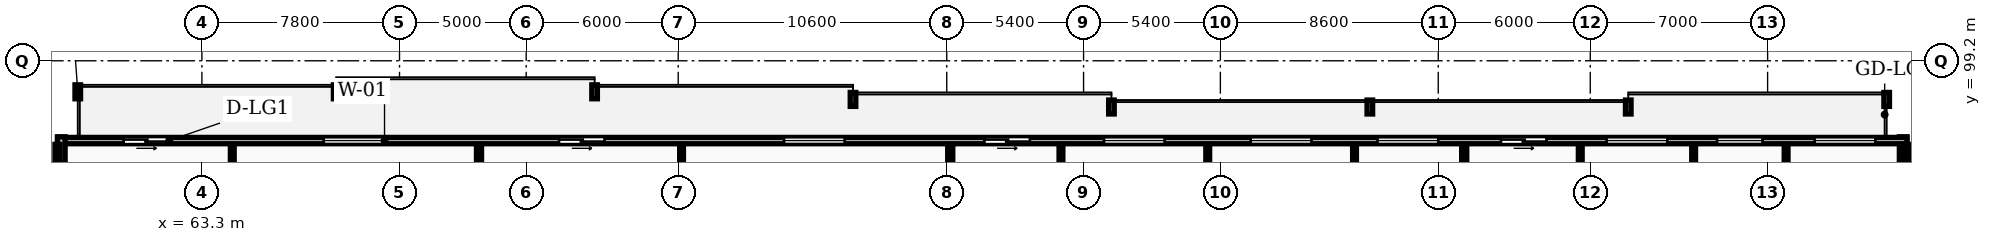
"""IFC4 building model, lengths in metres.
Left out: names, types, materials, properties, quantities, classifications, styles, units other than length and angle.
Written with IfcOpenShell. Run it as: python <this file> out.ifc"""

import sys

from ifc_helpers import new_model, si_unit, direction, frame, frame_2d, origin, place, context, subcontext, project, spatial, rectangle, extrude, element, fill, save


model = new_model("IFC4")
c1 = context("Model", 3, precision=1e-05, world=origin(), true_north=direction((0.0, 1.0)))
c2 = subcontext(c1, "Body", "Model", "MODEL_VIEW")
j1 = project(units=[si_unit("LENGTHUNIT", "METRE"), si_unit("PLANEANGLEUNIT", "RADIAN")], contexts=[c1])
p1 = place(None, origin())
s1 = spatial("IfcSite", under=j1, at=p1, CompositionType="ELEMENT")
p2 = place(p1, origin())
s2 = spatial("IfcBuilding", under=s1, at=p2, CompositionType="ELEMENT")
p3 = place(p2, frame((0.0, 0.0, 132.8)))
s3 = spatial("IfcBuildingStorey", under=s2, at=p3, CompositionType="ELEMENT", Elevation=132.8)
p4 = place(p3, frame((130.45, 92.6, 0.0), z_axis=(0.0, 0.0, 1.0), x_axis=(0.0, 1.0, 0.0)))
e1 = element("IfcWall", 1, at=p4, inside=s3, PredefinedType="STANDARD", context=c2, shape_type="SweptSolid", body=[
    extrude(rectangle(XDim=3.6, YDim=0.3, at=frame_2d((1.8, 0.0))), origin(), (0.0, 0.0, 1.0), 2.97),
])
p5 = place(p3, frame((130.6, 96.05, 0.0), z_axis=(0.0, 0.0, 1.0), x_axis=(-1.0, 0.0, 0.0)))
e2 = element("IfcWall", 2, at=p5, inside=s3, PredefinedType="STANDARD", context=c2, shape_type="SweptSolid", body=[
    extrude(rectangle(XDim=73.0, YDim=0.25, at=frame_2d((36.5, 0.0))), origin(), (0.0, 0.0, 1.0), 2.97),
])
p6 = place(p5, frame((68.591, 0.0, 0.0)))
e3 = element("IfcOpeningElement", 3, at=p6, cuts=e2, PredefinedType="OPENING", context=c2, shape_type="SweptSolid", body=[
    extrude(rectangle(XDim=1.8, YDim=2.2, at=frame_2d((0.9, 1.1))), frame((0.0, 0.135, 0.0), z_axis=(0.0, -1.0, 0.0), x_axis=(1.0, 0.0, 0.0)), (0.0, 0.0, 1.0), 0.27),
])
p7 = place(p5, frame((60.092, 0.0, 0.85)))
e4 = element("IfcOpeningElement", 4, at=p7, cuts=e2, PredefinedType="OPENING", context=c2, shape_type="SweptSolid", body=[
    extrude(rectangle(XDim=2.4, YDim=1.9, at=frame_2d((1.2, 0.95))), frame((0.0, 0.135, 0.0), z_axis=(0.0, -1.0, 0.0), x_axis=(1.0, 0.0, 0.0)), (0.0, 0.0, 1.0), 0.27),
])
p8 = place(p5, frame((51.405, 0.0, 0.0)))
e5 = element("IfcOpeningElement", 5, at=p8, cuts=e2, PredefinedType="OPENING", context=c2, shape_type="SweptSolid", body=[
    extrude(rectangle(XDim=1.8, YDim=2.2, at=frame_2d((0.9, 1.1))), frame((0.0, 0.135, 0.0), z_axis=(0.0, -1.0, 0.0), x_axis=(1.0, 0.0, 0.0)), (0.0, 0.0, 1.0), 0.27),
])
p9 = place(p5, frame((41.925, 0.0, 0.85)))
e6 = element("IfcOpeningElement", 6, at=p9, cuts=e2, PredefinedType="OPENING", context=c2, shape_type="SweptSolid", body=[
    extrude(rectangle(XDim=2.4, YDim=1.9, at=frame_2d((1.2, 0.95))), frame((0.0, 0.135, 0.0), z_axis=(0.0, -1.0, 0.0), x_axis=(1.0, 0.0, 0.0)), (0.0, 0.0, 1.0), 0.27),
])
p10 = place(p5, frame((29.296, 0.0, 0.85)))
e7 = element("IfcOpeningElement", 7, at=p10, cuts=e2, PredefinedType="OPENING", context=c2, shape_type="SweptSolid", body=[
    extrude(rectangle(XDim=2.4, YDim=1.9, at=frame_2d((1.2, 0.95))), frame((0.0, 0.135, 0.0), z_axis=(0.0, -1.0, 0.0), x_axis=(1.0, 0.0, 0.0)), (0.0, 0.0, 1.0), 0.27),
])
p11 = place(p5, frame((23.502, 0.0, 0.85)))
e8 = element("IfcOpeningElement", 8, at=p11, cuts=e2, PredefinedType="OPENING", context=c2, shape_type="SweptSolid", body=[
    extrude(rectangle(XDim=2.4, YDim=1.9, at=frame_2d((1.2, 0.95))), frame((0.0, 0.135, 0.0), z_axis=(0.0, -1.0, 0.0), x_axis=(1.0, 0.0, 0.0)), (0.0, 0.0, 1.0), 0.27),
])
p12 = place(p5, frame((34.617, 0.0, 0.0)))
e9 = element("IfcOpeningElement", 9, at=p12, cuts=e2, PredefinedType="OPENING", context=c2, shape_type="SweptSolid", body=[
    extrude(rectangle(XDim=1.8, YDim=2.2, at=frame_2d((0.9, 1.1))), frame((0.0, 0.135, 0.0), z_axis=(0.0, -1.0, 0.0), x_axis=(1.0, 0.0, 0.0)), (0.0, 0.0, 1.0), 0.27),
])
p13 = place(p5, frame((18.5, 0.0, 0.85)))
e10 = element("IfcOpeningElement", 10, at=p13, cuts=e2, PredefinedType="OPENING", context=c2, shape_type="SweptSolid", body=[
    extrude(rectangle(XDim=2.4, YDim=1.9, at=frame_2d((1.2, 0.95))), frame((0.0, 0.135, 0.0), z_axis=(0.0, -1.0, 0.0), x_axis=(1.0, 0.0, 0.0)), (0.0, 0.0, 1.0), 0.27),
])
p14 = place(p5, frame((9.458, 0.0, 0.85)))
e11 = element("IfcOpeningElement", 11, at=p14, cuts=e2, PredefinedType="OPENING", context=c2, shape_type="SweptSolid", body=[
    extrude(rectangle(XDim=2.4, YDim=1.9, at=frame_2d((1.2, 0.95))), frame((0.0, 0.135, 0.0), z_axis=(0.0, -1.0, 0.0), x_axis=(1.0, 0.0, 0.0)), (0.0, 0.0, 1.0), 0.27),
])
p15 = place(p5, frame((5.695, 0.0, 0.85)))
e12 = element("IfcOpeningElement", 12, at=p15, cuts=e2, PredefinedType="OPENING", context=c2, shape_type="SweptSolid", body=[
    extrude(rectangle(XDim=1.8, YDim=1.8, at=frame_2d((0.9, 0.9))), frame((0.0, 0.135, 0.0), z_axis=(0.0, -1.0, 0.0), x_axis=(1.0, 0.0, 0.0)), (0.0, 0.0, 1.0), 0.27),
])
p16 = place(p5, frame((14.225, 0.0, 0.0)))
e13 = element("IfcOpeningElement", 13, at=p16, cuts=e2, PredefinedType="OPENING", context=c2, shape_type="SweptSolid", body=[
    extrude(rectangle(XDim=1.8, YDim=2.2, at=frame_2d((0.9, 1.1))), frame((0.0, 0.135, 0.0), z_axis=(0.0, -1.0, 0.0), x_axis=(1.0, 0.0, 0.0)), (0.0, 0.0, 1.0), 0.27),
])
p17 = place(p5, frame((1.245, 0.0, 0.85)))
e14 = element("IfcOpeningElement", 14, at=p17, cuts=e2, PredefinedType="OPENING", context=c2, shape_type="SweptSolid", body=[
    extrude(rectangle(XDim=2.4, YDim=1.9, at=frame_2d((1.2, 0.95))), frame((0.0, 0.135, 0.0), z_axis=(0.0, -1.0, 0.0), x_axis=(1.0, 0.0, 0.0)), (0.0, 0.0, 1.0), 0.27),
])
p18 = place(p3, frame((57.75, 96.2, 0.0), z_axis=(0.0, 0.0, 1.0), x_axis=(0.0, -1.0, 0.0)))
e15 = element("IfcWall", 15, at=p18, inside=s3, PredefinedType="STANDARD", context=c2, shape_type="SweptSolid", body=[
    extrude(rectangle(XDim=3.6, YDim=0.3, at=frame_2d((1.8, 0.0))), origin(), (0.0, 0.0, 1.0), 2.97),
])
for number, where, z_axis, x_axis in (
    (16, (57.6, 69.83, 0.0), (0.0, 0.0, 1.0), (0.0, 1.0, 0.0)),
    (17, (130.6, 69.83, 0.0), (0.0, 0.0, 1.0), (0.0, 1.0, 0.0)),
    (18, (74.238, 69.83, 0.0), (0.0, 0.0, 1.0), (0.0, 1.0, 0.0)),
):
    element("IfcWall", number, at=place(p3, frame(where, z_axis=z_axis, x_axis=x_axis)), inside=s3, PredefinedType="PARTITIONING", context=c2, shape_type="SweptSolid", body=[
        extrude(rectangle(XDim=26.07, YDim=0.2, at=frame_2d((13.035, 0.0))), origin(), (0.0, 0.0, 1.0), 2.97),
    ])
p19 = place(p3, frame((64.499, 91.43, 0.0), z_axis=(0.0, 0.0, 1.0), x_axis=(0.0, 1.0, 0.0)))
e19 = element("IfcWall", 19, at=p19, inside=s3, PredefinedType="PARTITIONING", context=c2, shape_type="SweptSolid", body=[
    extrude(rectangle(XDim=4.47, YDim=0.15, at=frame_2d((2.235, 0.0))), origin(), (0.0, 0.0, 1.0), 2.97),
])
p20 = place(p3, frame((92.837, 69.83, 0.0), z_axis=(0.0, 0.0, 1.0), x_axis=(0.0, 1.0, 0.0)))
e20 = element("IfcWall", 20, at=p20, inside=s3, PredefinedType="PARTITIONING", context=c2, shape_type="SweptSolid", body=[
    extrude(rectangle(XDim=26.07, YDim=0.2, at=frame_2d((13.035, 0.0))), origin(), (0.0, 0.0, 1.0), 2.97),
])
p21 = place(p3, frame((82.232, 91.43, 0.0), z_axis=(0.0, 0.0, 1.0), x_axis=(0.0, 1.0, 0.0)))
e21 = element("IfcWall", 21, at=p21, inside=s3, PredefinedType="PARTITIONING", context=c2, shape_type="SweptSolid", body=[
    extrude(rectangle(XDim=4.47, YDim=0.15, at=frame_2d((2.235, 0.0))), origin(), (0.0, 0.0, 1.0), 2.97),
])
p22 = place(p3, frame((113.125, 69.83, 0.0), z_axis=(0.0, 0.0, 1.0), x_axis=(0.0, 1.0, 0.0)))
e22 = element("IfcWall", 22, at=p22, inside=s3, PredefinedType="PARTITIONING", context=c2, shape_type="SweptSolid", body=[
    extrude(rectangle(XDim=26.07, YDim=0.2, at=frame_2d((13.035, 0.0))), origin(), (0.0, 0.0, 1.0), 2.97),
])
p23 = place(p3, frame((103.001, 91.43, 0.0), z_axis=(0.0, 0.0, 1.0), x_axis=(0.0, 1.0, 0.0)))
e23 = element("IfcWall", 23, at=p23, inside=s3, PredefinedType="PARTITIONING", context=c2, shape_type="SweptSolid", body=[
    extrude(rectangle(XDim=4.47, YDim=0.15, at=frame_2d((2.235, 0.0))), origin(), (0.0, 0.0, 1.0), 2.97),
])
p24 = place(p3, frame((97.208, 86.29, 0.0), z_axis=(0.0, 0.0, 1.0), x_axis=(0.0, 1.0, 0.0)))
e24 = element("IfcWall", 24, at=p24, inside=s3, PredefinedType="PARTITIONING", context=c2, shape_type="SweptSolid", body=[
    extrude(rectangle(XDim=9.61, YDim=0.15, at=frame_2d((4.805, 0.0))), origin(), (0.0, 0.0, 1.0), 2.97),
])
p25 = place(p24, frame((3.82, 0.0, 0.0)))
e25 = element("IfcOpeningElement", 25, at=p25, cuts=e24, PredefinedType="OPENING", context=c2, shape_type="SweptSolid", body=[
    extrude(rectangle(XDim=0.92, YDim=2.08, at=frame_2d((0.46, 1.04))), frame((0.0, 0.085, 0.0), z_axis=(0.0, -1.0, 0.0), x_axis=(1.0, 0.0, 0.0)), (0.0, 0.0, 1.0), 0.17),
])
p26 = place(p3, frame((108.795, 89.02, 0.0), z_axis=(0.0, 0.0, 1.0), x_axis=(0.0, 1.0, 0.0)))
e26 = element("IfcWall", 26, at=p26, inside=s3, PredefinedType="PARTITIONING", context=c2, shape_type="SweptSolid", body=[
    extrude(rectangle(XDim=6.88, YDim=0.15, at=frame_2d((3.44, 0.0))), origin(), (0.0, 0.0, 1.0), 2.97),
])
p27 = place(p26, frame((1.09, 0.0, 0.0)))
e27 = element("IfcOpeningElement", 27, at=p27, cuts=e26, PredefinedType="OPENING", context=c2, shape_type="SweptSolid", body=[
    extrude(rectangle(XDim=0.92, YDim=2.08, at=frame_2d((0.46, 1.04))), frame((0.0, 0.085, 0.0), z_axis=(0.0, -1.0, 0.0), x_axis=(1.0, 0.0, 0.0)), (0.0, 0.0, 1.0), 0.17),
])
p28 = place(p3, frame((122.18, 91.43, 0.0), z_axis=(0.0, 0.0, 1.0), x_axis=(0.0, 1.0, 0.0)))
e28 = element("IfcWall", 28, at=p28, inside=s3, PredefinedType="PARTITIONING", context=c2, shape_type="SweptSolid", body=[
    extrude(rectangle(XDim=4.47, YDim=0.15, at=frame_2d((2.235, 0.0))), origin(), (0.0, 0.0, 1.0), 2.97),
])
p29 = place(p3, frame((117.705, 86.29, 0.0), z_axis=(0.0, 0.0, 1.0), x_axis=(0.0, 1.0, 0.0)))
e29 = element("IfcWall", 29, at=p29, inside=s3, PredefinedType="PARTITIONING", context=c2, shape_type="SweptSolid", body=[
    extrude(rectangle(XDim=9.61, YDim=0.15, at=frame_2d((4.805, 0.0))), origin(), (0.0, 0.0, 1.0), 2.97),
])
p30 = place(p29, frame((2.88, 0.0, 0.0)))
e30 = element("IfcOpeningElement", 30, at=p30, cuts=e29, PredefinedType="OPENING", context=c2, shape_type="SweptSolid", body=[
    extrude(rectangle(XDim=0.92, YDim=2.08, at=frame_2d((0.46, 1.04))), frame((0.0, 0.085, 0.0), z_axis=(0.0, -1.0, 0.0), x_axis=(1.0, 0.0, 0.0)), (0.0, 0.0, 1.0), 0.17),
])
p31 = place(p3, frame((125.83, 88.91, 0.0), z_axis=(0.0, 0.0, 1.0), x_axis=(0.0, 1.0, 0.0)))
e31 = element("IfcWall", 31, at=p31, inside=s3, PredefinedType="PARTITIONING", context=c2, shape_type="SweptSolid", body=[
    extrude(rectangle(XDim=6.99, YDim=0.15, at=frame_2d((3.495, 0.0))), origin(), (0.0, 0.0, 1.0), 2.97),
])
p32 = place(p31, frame((0.26, 0.0, 0.0)))
e32 = element("IfcOpeningElement", 32, at=p32, cuts=e31, PredefinedType="OPENING", context=c2, shape_type="SweptSolid", body=[
    extrude(rectangle(XDim=0.92, YDim=2.08, at=frame_2d((0.46, 1.04))), frame((0.0, 0.085, 0.0), z_axis=(0.0, -1.0, 0.0), x_axis=(1.0, 0.0, 0.0)), (0.0, 0.0, 1.0), 0.17),
])
p33 = place(p6, origin())
e33 = element("IfcDoor", 33, at=p33, inside=s3, OperationType="SLIDING_TO_LEFT", PredefinedType="DOOR", context=c2, shape_type="SweptSolid", body=[
    extrude(rectangle(XDim=1.8, YDim=2.2, at=frame_2d((0.9, 1.1))), frame((0.0, 0.025, 0.0), z_axis=(0.0, -1.0, 0.0), x_axis=(1.0, 0.0, 0.0)), (0.0, 0.0, 1.0), 0.05),
])
fill(e3, e33)
p34 = place(p7, origin())
e34 = element("IfcWindow", 34, at=p34, inside=s3, PartitioningType="DOUBLE_PANEL_VERTICAL", PredefinedType="WINDOW", context=c2, shape_type="SweptSolid", body=[
    extrude(rectangle(XDim=2.4, YDim=1.9, at=frame_2d((1.2, 0.95))), frame((0.0, 0.03, 0.0), z_axis=(0.0, -1.0, 0.0), x_axis=(1.0, 0.0, 0.0)), (0.0, 0.0, 1.0), 0.06),
])
fill(e4, e34)
p35 = place(p8, origin())
e35 = element("IfcDoor", 35, at=p35, inside=s3, OperationType="SLIDING_TO_LEFT", PredefinedType="DOOR", context=c2, shape_type="SweptSolid", body=[
    extrude(rectangle(XDim=1.8, YDim=2.2, at=frame_2d((0.9, 1.1))), frame((0.0, 0.025, 0.0), z_axis=(0.0, -1.0, 0.0), x_axis=(1.0, 0.0, 0.0)), (0.0, 0.0, 1.0), 0.05),
])
fill(e5, e35)
p36 = place(p9, origin())
e36 = element("IfcWindow", 36, at=p36, inside=s3, PartitioningType="DOUBLE_PANEL_VERTICAL", PredefinedType="WINDOW", context=c2, shape_type="SweptSolid", body=[
    extrude(rectangle(XDim=2.4, YDim=1.9, at=frame_2d((1.2, 0.95))), frame((0.0, 0.03, 0.0), z_axis=(0.0, -1.0, 0.0), x_axis=(1.0, 0.0, 0.0)), (0.0, 0.0, 1.0), 0.06),
])
fill(e6, e36)
p37 = place(p10, origin())
e37 = element("IfcWindow", 37, at=p37, inside=s3, PartitioningType="DOUBLE_PANEL_VERTICAL", PredefinedType="WINDOW", context=c2, shape_type="SweptSolid", body=[
    extrude(rectangle(XDim=2.4, YDim=1.9, at=frame_2d((1.2, 0.95))), frame((0.0, 0.03, 0.0), z_axis=(0.0, -1.0, 0.0), x_axis=(1.0, 0.0, 0.0)), (0.0, 0.0, 1.0), 0.06),
])
fill(e7, e37)
p38 = place(p11, origin())
e38 = element("IfcWindow", 38, at=p38, inside=s3, PartitioningType="DOUBLE_PANEL_VERTICAL", PredefinedType="WINDOW", context=c2, shape_type="SweptSolid", body=[
    extrude(rectangle(XDim=2.4, YDim=1.9, at=frame_2d((1.2, 0.95))), frame((0.0, 0.03, 0.0), z_axis=(0.0, -1.0, 0.0), x_axis=(1.0, 0.0, 0.0)), (0.0, 0.0, 1.0), 0.06),
])
fill(e8, e38)
p39 = place(p12, origin())
e39 = element("IfcDoor", 39, at=p39, inside=s3, OperationType="SLIDING_TO_LEFT", PredefinedType="DOOR", context=c2, shape_type="SweptSolid", body=[
    extrude(rectangle(XDim=1.8, YDim=2.2, at=frame_2d((0.9, 1.1))), frame((0.0, 0.025, 0.0), z_axis=(0.0, -1.0, 0.0), x_axis=(1.0, 0.0, 0.0)), (0.0, 0.0, 1.0), 0.05),
])
fill(e9, e39)
p40 = place(p13, origin())
e40 = element("IfcWindow", 40, at=p40, inside=s3, PartitioningType="DOUBLE_PANEL_VERTICAL", PredefinedType="WINDOW", context=c2, shape_type="SweptSolid", body=[
    extrude(rectangle(XDim=2.4, YDim=1.9, at=frame_2d((1.2, 0.95))), frame((0.0, 0.03, 0.0), z_axis=(0.0, -1.0, 0.0), x_axis=(1.0, 0.0, 0.0)), (0.0, 0.0, 1.0), 0.06),
])
fill(e10, e40)
p41 = place(p14, origin())
e41 = element("IfcWindow", 41, at=p41, inside=s3, PartitioningType="DOUBLE_PANEL_VERTICAL", PredefinedType="WINDOW", context=c2, shape_type="SweptSolid", body=[
    extrude(rectangle(XDim=2.4, YDim=1.9, at=frame_2d((1.2, 0.95))), frame((0.0, 0.03, 0.0), z_axis=(0.0, -1.0, 0.0), x_axis=(1.0, 0.0, 0.0)), (0.0, 0.0, 1.0), 0.06),
])
fill(e11, e41)
p42 = place(p15, origin())
e42 = element("IfcWindow", 42, at=p42, inside=s3, PartitioningType="SINGLE_PANEL", PredefinedType="WINDOW", context=c2, shape_type="SweptSolid", body=[
    extrude(rectangle(XDim=1.8, YDim=1.8, at=frame_2d((0.9, 0.9))), frame((0.0, 0.03, 0.0), z_axis=(0.0, -1.0, 0.0), x_axis=(1.0, 0.0, 0.0)), (0.0, 0.0, 1.0), 0.06),
])
fill(e12, e42)
p43 = place(p16, origin())
e43 = element("IfcDoor", 43, at=p43, inside=s3, OperationType="SLIDING_TO_LEFT", PredefinedType="DOOR", context=c2, shape_type="SweptSolid", body=[
    extrude(rectangle(XDim=1.8, YDim=2.2, at=frame_2d((0.9, 1.1))), frame((0.0, 0.025, 0.0), z_axis=(0.0, -1.0, 0.0), x_axis=(1.0, 0.0, 0.0)), (0.0, 0.0, 1.0), 0.05),
])
fill(e13, e43)
p44 = place(p17, origin())
e44 = element("IfcWindow", 44, at=p44, inside=s3, PartitioningType="DOUBLE_PANEL_VERTICAL", PredefinedType="WINDOW", context=c2, shape_type="SweptSolid", body=[
    extrude(rectangle(XDim=2.4, YDim=1.9, at=frame_2d((1.2, 0.95))), frame((0.0, 0.03, 0.0), z_axis=(0.0, -1.0, 0.0), x_axis=(1.0, 0.0, 0.0)), (0.0, 0.0, 1.0), 0.06),
])
fill(e14, e44)
save(model, sys.argv[1])
